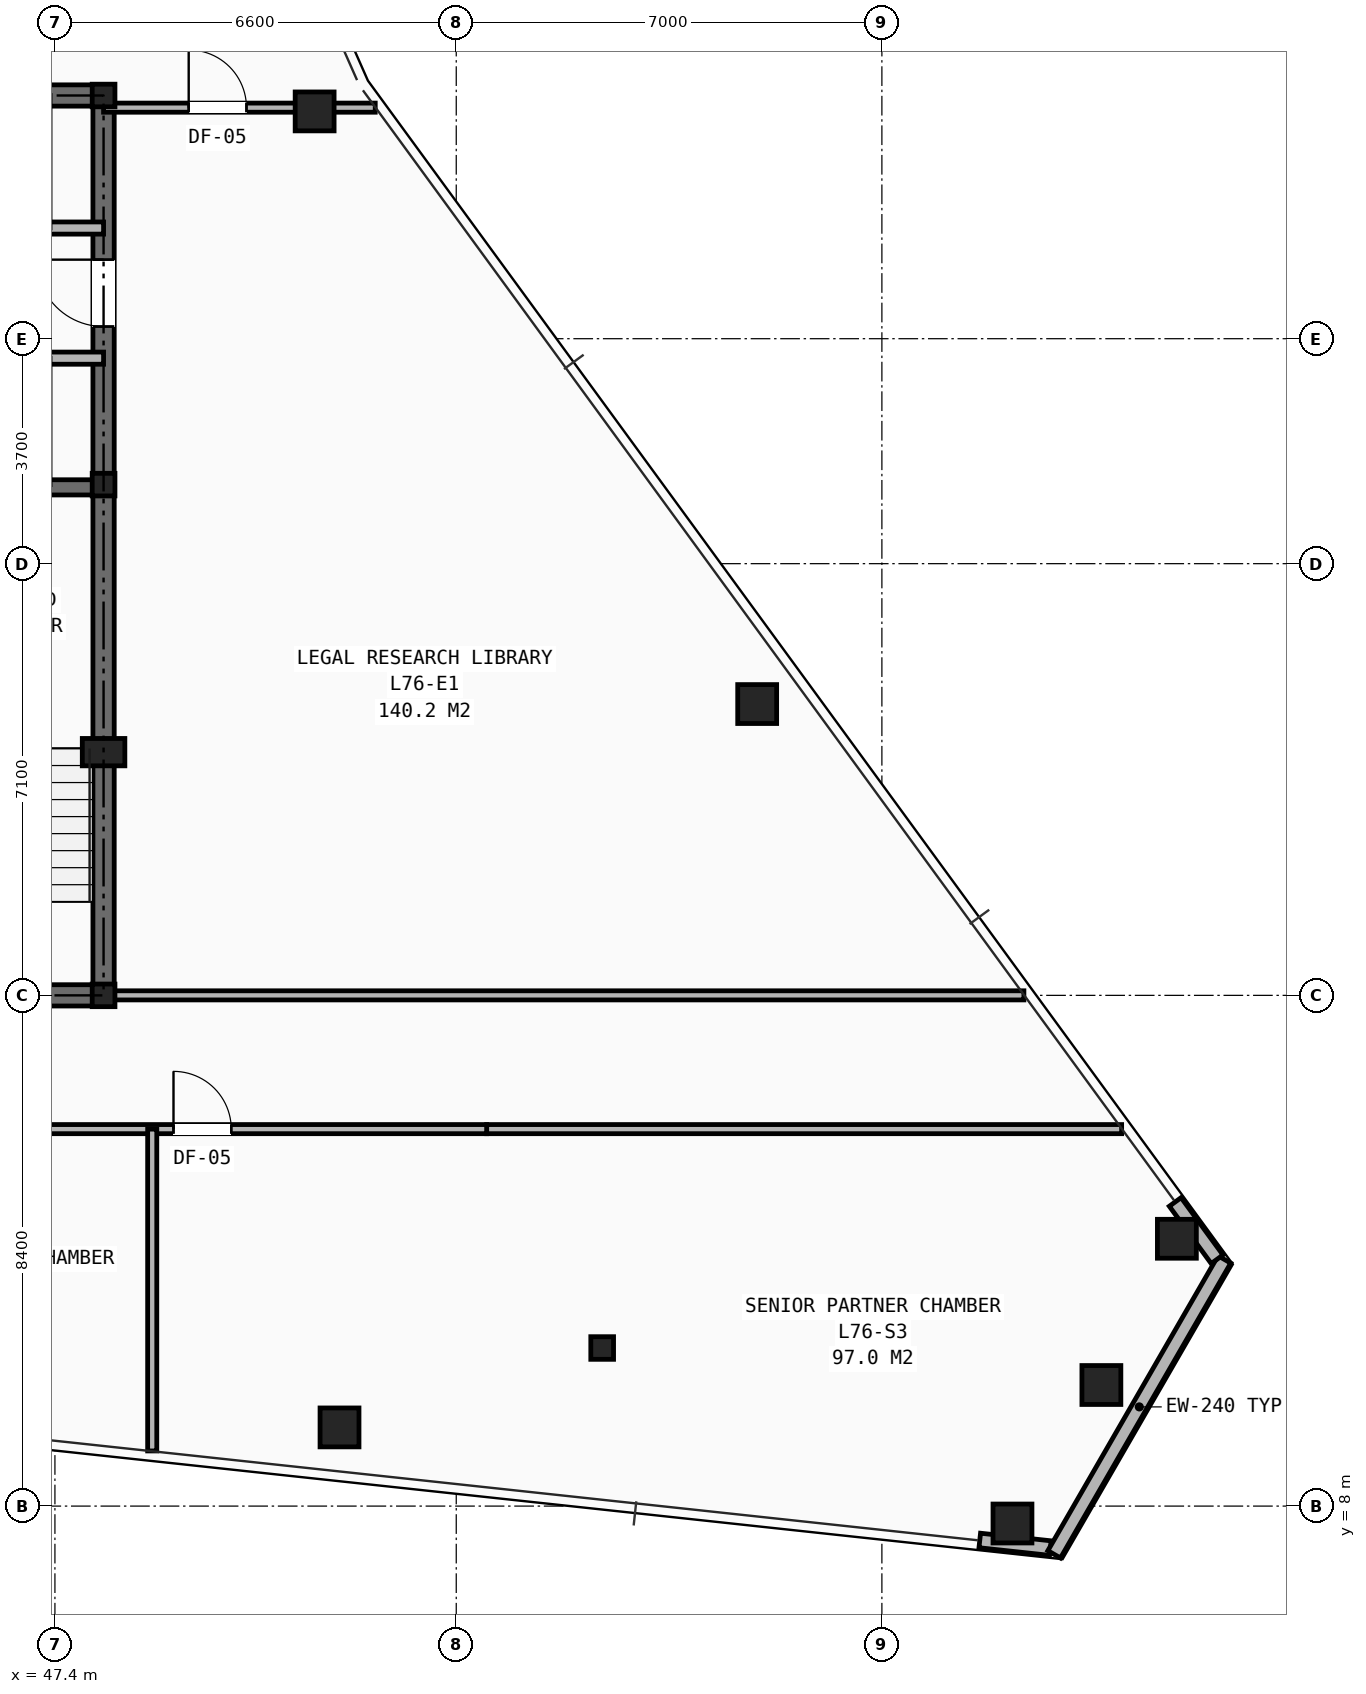
"""IFC4 building model, lengths in metres.
Left out: names, types, materials, properties, quantities, classifications, styles, units other than length and angle.
Written with IfcOpenShell. Run it as: python <this file> out.ifc"""

import sys

from ifc_helpers import new_model, si_unit, direction, frame, frame_2d, origin, origin_2d, place, context, subcontext, project, spatial, rectangle, hollow_rectangle, i_section, extrude, element, fill, save


model = new_model("IFC4")
c1 = context("Model", 3, precision=1e-05, world=origin(), true_north=direction((0.0, 1.0)))
c2 = subcontext(c1, "Body", "Model", "MODEL_VIEW")
j1 = project(units=[si_unit("LENGTHUNIT", "METRE"), si_unit("PLANEANGLEUNIT", "RADIAN")], contexts=[c1])
p1 = place(None, origin())
s1 = spatial("IfcSite", under=j1, at=p1, CompositionType="ELEMENT")
p2 = place(p1, origin())
s2 = spatial("IfcBuilding", under=s1, at=p2, CompositionType="ELEMENT")
p3 = place(p2, frame((0.0, 0.0, 269.0)))
s3 = spatial("IfcBuildingStorey", under=s2, at=p3, CompositionType="ELEMENT", Elevation=269.0)
for number, where, z_axis, x_axis in (
    (1, (48.2, 16.4, 0.0), (0.0, 0.0, 1.0), (1.0, 0.0, 0.0)),
    (2, (48.2, 24.8, 0.0), (0.0, 0.0, 1.0), (1.0, 0.0, 0.0)),
    (3, (48.2, 31.2, 0.0), (0.0, 0.0, 1.0), (1.0, 0.0, 0.0)),
    (4, (56.4, 10.6, 0.0), (0.0, 0.0, 1.0), (1.0, 0.0, 0.0)),
):
    element("IfcColumn", number, at=place(p3, frame(where, z_axis=z_axis, x_axis=x_axis)), inside=s3, PredefinedType="COLUMN", context=c2, shape_type="SweptSolid", body=[
        extrude(i_section(OverallWidth=0.374, OverallDepth=0.372, WebThickness=0.016, FlangeThickness=0.026, at=origin_2d()), origin(), (0.0, 0.0, 1.0), 3.5),
    ])
p4 = place(p3, frame((48.2, 20.4, 0.0), z_axis=(0.0, 0.0, 1.0), x_axis=(1.0, 0.0, 0.0)))
e5 = element("IfcColumn", 5, at=p4, inside=s3, PredefinedType="PILASTER", context=c2, shape_type="SweptSolid", body=[
    extrude(rectangle(XDim=0.7, YDim=0.45, at=origin_2d()), origin(), (0.0, 0.0, 1.0), 3.5),
])
for number, where, z_axis, x_axis in (
    (6, (52.08, 9.294, 0.0), (0.0, 0.0, 1.0), (1.0, 0.0, 0.0)),
    (7, (63.148, 7.714, 0.0), (0.0, 0.0, 1.0), (1.0, 0.0, 0.0)),
    (8, (64.61, 9.991, 0.0), (0.0, 0.0, 1.0), (1.0, 0.0, 0.0)),
    (9, (65.851, 12.397, 0.0), (0.0, 0.0, 1.0), (1.0, 0.0, 0.0)),
    (10, (58.949, 21.191, 0.0), (0.0, 0.0, 1.0), (1.0, 0.0, 0.0)),
    (11, (51.671, 30.938, 0.0), (0.0, 0.0, 1.0), (1.0, 0.0, 0.0)),
):
    element("IfcColumn", number, at=place(p3, frame(where, z_axis=z_axis, x_axis=x_axis)), inside=s3, PredefinedType="COLUMN", context=c2, shape_type="SweptSolid", body=[
        extrude(hollow_rectangle(XDim=0.64, YDim=0.64, WallThickness=0.045, at=origin_2d()), origin(), (0.0, 0.0, 1.0), 3.5),
    ])
p5 = place(p3, frame((62.61, 7.435, 0.0), z_axis=(0.0, 0.0, 1.0), x_axis=(0.994228168344, -0.107286295827, 0.0)))
e12 = element("IfcWall", 12, at=p5, inside=s3, PredefinedType="SHEAR", context=c2, shape_type="SweptSolid", body=[
    extrude(rectangle(XDim=1.167, YDim=0.24, at=frame_2d((0.584, 0.0))), origin(), (0.0, 0.0, 1.0), 2.623),
])
p6 = place(p3, frame((66.633, 12.056, 0.0), z_axis=(0.0, 0.0, 1.0), x_axis=(-0.49999793692, -0.866026594901, 0.0)))
e13 = element("IfcWall", 13, at=p6, inside=s3, PredefinedType="SHEAR", context=c2, shape_type="SweptSolid", body=[
    extrude(rectangle(XDim=5.6, YDim=0.24, at=frame_2d((2.8, 0.0))), origin(), (0.0, 0.0, 1.0), 2.623),
])
p7 = place(p3, frame((66.513, 12.06, 0.0), z_axis=(0.0, 0.0, 1.0), x_axis=(-0.589948424207, 0.807440930827, 0.0)))
e14 = element("IfcWall", 14, at=p7, inside=s3, PredefinedType="SHEAR", context=c2, shape_type="SweptSolid", body=[
    extrude(rectangle(XDim=1.167, YDim=0.24, at=frame_2d((0.584, 0.0))), origin(), (0.0, 0.0, 1.0), 2.623),
])
p8 = place(p3, frame((31.8, 16.4, 0.0), z_axis=(0.0, 0.0, 1.0), x_axis=(1.0, 0.0, 0.0)))
e15 = element("IfcWall", 15, at=p8, inside=s3, PredefinedType="SHEAR", context=c2, shape_type="SweptSolid", body=[
    extrude(rectangle(XDim=16.4, YDim=0.35, at=frame_2d((8.2, 0.0))), origin(), (0.0, 0.0, 1.0), 3.25),
])
p9 = place(p8, frame((4.2, 0.0, 0.0)))
e16 = element("IfcOpeningElement", 16, at=p9, cuts=e15, PredefinedType="OPENING", context=c2, shape_type="SweptSolid", body=[
    extrude(rectangle(XDim=0.95, YDim=2.1, at=frame_2d((0.475, 1.05))), frame((0.0, 0.185, 0.0), z_axis=(0.0, -1.0, 0.0), x_axis=(1.0, 0.0, 0.0)), (0.0, 0.0, 1.0), 0.37),
])
p10 = place(p8, frame((10.6, 0.0, 0.0)))
e17 = element("IfcOpeningElement", 17, at=p10, cuts=e15, PredefinedType="OPENING", context=c2, shape_type="SweptSolid", body=[
    extrude(rectangle(XDim=0.95, YDim=2.1, at=frame_2d((0.475, 1.05))), frame((0.0, 0.185, 0.0), z_axis=(0.0, -1.0, 0.0), x_axis=(1.0, 0.0, 0.0)), (0.0, 0.0, 1.0), 0.37),
])
p11 = place(p3, frame((31.8, 31.2, 0.0), z_axis=(0.0, 0.0, 1.0), x_axis=(1.0, 0.0, 0.0)))
e18 = element("IfcWall", 18, at=p11, inside=s3, PredefinedType="SHEAR", context=c2, shape_type="SweptSolid", body=[
    extrude(rectangle(XDim=16.4, YDim=0.35, at=frame_2d((8.2, 0.0))), origin(), (0.0, 0.0, 1.0), 3.25),
])
p12 = place(p3, frame((48.2, 16.4, 0.0), z_axis=(0.0, 0.0, 1.0), x_axis=(0.0, 1.0, 0.0)))
e19 = element("IfcWall", 19, at=p12, inside=s3, PredefinedType="SHEAR", context=c2, shape_type="SweptSolid", body=[
    extrude(rectangle(XDim=14.8, YDim=0.35, at=frame_2d((7.4, 0.0))), origin(), (0.0, 0.0, 1.0), 3.25),
])
p13 = place(p12, frame((11.0, 0.0, 0.0)))
e20 = element("IfcOpeningElement", 20, at=p13, cuts=e19, PredefinedType="OPENING", context=c2, shape_type="SweptSolid", body=[
    extrude(rectangle(XDim=1.1, YDim=2.15, at=frame_2d((0.55, 1.075))), frame((0.0, 0.185, 0.0), z_axis=(0.0, -1.0, 0.0), x_axis=(1.0, 0.0, 0.0)), (0.0, 0.0, 1.0), 0.37),
])
p14 = place(p3, frame((44.955, 24.755, 0.0), z_axis=(0.0, 0.0, 1.0), x_axis=(1.0, 0.0, 0.0)))
e21 = element("IfcWall", 21, at=p14, inside=s3, PredefinedType="SHEAR", context=c2, shape_type="SweptSolid", body=[
    extrude(rectangle(XDim=3.245, YDim=0.25, at=frame_2d((1.623, 0.0))), origin(), (0.0, 0.0, 1.0), 3.25),
])
p15 = place(p3, frame((33.82, 29.02, 0.0), z_axis=(0.0, 0.0, 1.0), x_axis=(1.0, 0.0, 0.0)))
e22 = element("IfcWall", 22, at=p15, inside=s3, PredefinedType="SOLIDWALL", context=c2, shape_type="SweptSolid", body=[
    extrude(rectangle(XDim=14.38, YDim=0.2, at=frame_2d((7.19, 0.0))), origin(), (0.0, 0.0, 1.0), 2.705),
])
p16 = place(p15, frame((3.92, 0.0, 0.0)))
e23 = element("IfcOpeningElement", 23, at=p16, cuts=e22, PredefinedType="OPENING", context=c2, shape_type="SweptSolid", body=[
    extrude(rectangle(XDim=0.9, YDim=2.1, at=frame_2d((0.45, 1.05))), frame((0.0, 0.11, 0.0), z_axis=(0.0, -1.0, 0.0), x_axis=(1.0, 0.0, 0.0)), (0.0, 0.0, 1.0), 0.22),
])
p17 = place(p15, frame((9.39, 0.0, 0.0)))
e24 = element("IfcOpeningElement", 24, at=p17, cuts=e22, PredefinedType="OPENING", context=c2, shape_type="SweptSolid", body=[
    extrude(rectangle(XDim=1.1, YDim=2.15, at=frame_2d((0.55, 1.075))), frame((0.0, 0.11, 0.0), z_axis=(0.0, -1.0, 0.0), x_axis=(1.0, 0.0, 0.0)), (0.0, 0.0, 1.0), 0.22),
])
p18 = place(p15, frame((11.71, 0.0, 0.0)))
e25 = element("IfcOpeningElement", 25, at=p18, cuts=e22, PredefinedType="OPENING", context=c2, shape_type="SweptSolid", body=[
    extrude(rectangle(XDim=1.1, YDim=2.15, at=frame_2d((0.55, 1.075))), frame((0.0, 0.11, 0.0), z_axis=(0.0, -1.0, 0.0), x_axis=(1.0, 0.0, 0.0)), (0.0, 0.0, 1.0), 0.22),
])
p19 = place(p3, frame((33.82, 26.88, 0.0), z_axis=(0.0, 0.0, 1.0), x_axis=(1.0, 0.0, 0.0)))
e26 = element("IfcWall", 26, at=p19, inside=s3, PredefinedType="SOLIDWALL", context=c2, shape_type="SweptSolid", body=[
    extrude(rectangle(XDim=14.38, YDim=0.2, at=frame_2d((7.19, 0.0))), origin(), (0.0, 0.0, 1.0), 2.705),
])
p20 = place(p19, frame((1.78, 0.0, 0.0)))
e27 = element("IfcOpeningElement", 27, at=p20, cuts=e26, PredefinedType="OPENING", context=c2, shape_type="SweptSolid", body=[
    extrude(rectangle(XDim=0.9, YDim=2.1, at=frame_2d((0.45, 1.05))), frame((0.0, 0.11, 0.0), z_axis=(0.0, -1.0, 0.0), x_axis=(1.0, 0.0, 0.0)), (0.0, 0.0, 1.0), 0.22),
])
p21 = place(p19, frame((6.07, 0.0, 0.0)))
e28 = element("IfcOpeningElement", 28, at=p21, cuts=e26, PredefinedType="OPENING", context=c2, shape_type="SweptSolid", body=[
    extrude(rectangle(XDim=0.9, YDim=2.1, at=frame_2d((0.45, 1.05))), frame((0.0, 0.11, 0.0), z_axis=(0.0, -1.0, 0.0), x_axis=(1.0, 0.0, 0.0)), (0.0, 0.0, 1.0), 0.22),
])
p22 = place(p19, frame((9.39, 0.0, 0.0)))
e29 = element("IfcOpeningElement", 29, at=p22, cuts=e26, PredefinedType="OPENING", context=c2, shape_type="SweptSolid", body=[
    extrude(rectangle(XDim=1.1, YDim=2.15, at=frame_2d((0.55, 1.075))), frame((0.0, 0.11, 0.0), z_axis=(0.0, -1.0, 0.0), x_axis=(1.0, 0.0, 0.0)), (0.0, 0.0, 1.0), 0.22),
])
p23 = place(p19, frame((11.71, 0.0, 0.0)))
e30 = element("IfcOpeningElement", 30, at=p23, cuts=e26, PredefinedType="OPENING", context=c2, shape_type="SweptSolid", body=[
    extrude(rectangle(XDim=1.1, YDim=2.15, at=frame_2d((0.55, 1.075))), frame((0.0, 0.11, 0.0), z_axis=(0.0, -1.0, 0.0), x_axis=(1.0, 0.0, 0.0)), (0.0, 0.0, 1.0), 0.22),
])
p24 = place(p3, frame((54.5, 14.2, 0.0), z_axis=(0.0, 0.0, 1.0), x_axis=(1.0, 0.0, 0.0)))
e31 = element("IfcWall", 31, at=p24, inside=s3, PredefinedType="PARTITIONING", context=c2, shape_type="SweptSolid", body=[
    extrude(rectangle(XDim=10.443, YDim=0.15, at=frame_2d((5.221, 0.0))), origin(), (0.0, 0.0, 1.0), 2.292),
])
p25 = place(p3, frame((48.2, 16.4, 0.0), z_axis=(0.0, 0.0, 1.0), x_axis=(1.0, 0.0, 0.0)))
e32 = element("IfcWall", 32, at=p25, inside=s3, PredefinedType="PARTITIONING", context=c2, shape_type="SweptSolid", body=[
    extrude(rectangle(XDim=15.135, YDim=0.15, at=frame_2d((7.568, 0.0))), origin(), (0.0, 0.0, 1.0), 2.292),
])
p26 = place(p3, frame((25.5, 14.2, 0.0), z_axis=(0.0, 0.0, 1.0), x_axis=(1.0, 0.0, 0.0)))
e33 = element("IfcWall", 33, at=p26, inside=s3, PredefinedType="PARTITIONING", context=c2, shape_type="SweptSolid", body=[
    extrude(rectangle(XDim=29.0, YDim=0.15, at=frame_2d((14.5, 0.0))), origin(), (0.0, 0.0, 1.0), 2.292),
])
p27 = place(p26, frame((0.85, 0.0, 0.0)))
e34 = element("IfcOpeningElement", 34, at=p27, cuts=e33, PredefinedType="OPENING", context=c2, shape_type="SweptSolid", body=[
    extrude(rectangle(XDim=0.95, YDim=2.1, at=frame_2d((0.475, 1.05))), frame((0.0, 0.085, 0.0), z_axis=(0.0, -1.0, 0.0), x_axis=(1.0, 0.0, 0.0)), (0.0, 0.0, 1.0), 0.17),
])
p28 = place(p26, frame((5.85, 0.0, 0.0)))
e35 = element("IfcOpeningElement", 35, at=p28, cuts=e33, PredefinedType="OPENING", context=c2, shape_type="SweptSolid", body=[
    extrude(rectangle(XDim=0.95, YDim=2.1, at=frame_2d((0.475, 1.05))), frame((0.0, 0.085, 0.0), z_axis=(0.0, -1.0, 0.0), x_axis=(1.0, 0.0, 0.0)), (0.0, 0.0, 1.0), 0.17),
])
p29 = place(p26, frame((23.85, 0.0, 0.0)))
e36 = element("IfcOpeningElement", 36, at=p29, cuts=e33, PredefinedType="OPENING", context=c2, shape_type="SweptSolid", body=[
    extrude(rectangle(XDim=0.95, YDim=2.1, at=frame_2d((0.475, 1.05))), frame((0.0, 0.085, 0.0), z_axis=(0.0, -1.0, 0.0), x_axis=(1.0, 0.0, 0.0)), (0.0, 0.0, 1.0), 0.17),
])
p30 = place(p3, frame((49.0, 8.907, 0.0), z_axis=(0.0, 0.0, 1.0), x_axis=(0.0, 1.0, 0.0)))
e37 = element("IfcWall", 37, at=p30, inside=s3, PredefinedType="PARTITIONING", context=c2, shape_type="SweptSolid", body=[
    extrude(rectangle(XDim=5.293, YDim=0.15, at=frame_2d((2.646, 0.0))), origin(), (0.0, 0.0, 1.0), 2.628),
])
p31 = place(p3, frame((48.2, 31.0, 0.0), z_axis=(0.0, 0.0, 1.0), x_axis=(1.0, 0.0, 0.0)))
e38 = element("IfcWall", 38, at=p31, inside=s3, PredefinedType="PARTITIONING", context=c2, shape_type="SweptSolid", body=[
    extrude(rectangle(XDim=4.468, YDim=0.15, at=frame_2d((2.234, 0.0))), origin(), (0.0, 0.0, 1.0), 2.292),
])
p32 = place(p31, frame((1.4, 0.0, 0.0)))
e39 = element("IfcOpeningElement", 39, at=p32, cuts=e38, PredefinedType="OPENING", context=c2, shape_type="SweptSolid", body=[
    extrude(rectangle(XDim=0.95, YDim=2.1, at=frame_2d((0.475, 1.05))), frame((0.0, 0.085, 0.0), z_axis=(0.0, -1.0, 0.0), x_axis=(1.0, 0.0, 0.0)), (0.0, 0.0, 1.0), 0.17),
])
p33 = place(p13, origin())
e40 = element("IfcDoor", 40, at=p33, inside=s3, OperationType="SINGLE_SWING_RIGHT", PredefinedType="DOOR", context=c2, shape_type="SweptSolid", body=[
    extrude(rectangle(XDim=1.1, YDim=2.15, at=frame_2d((0.55, 1.075))), frame((0.0, 0.025, 0.0), z_axis=(0.0, -1.0, 0.0), x_axis=(1.0, 0.0, 0.0)), (0.0, 0.0, 1.0), 0.05),
])
fill(e20, e40)
p34 = place(p29, origin())
e41 = element("IfcDoor", 41, at=p34, inside=s3, OperationType="SINGLE_SWING_LEFT", PredefinedType="DOOR", context=c2, shape_type="SweptSolid", body=[
    extrude(rectangle(XDim=0.95, YDim=2.1, at=frame_2d((0.475, 1.05))), frame((0.0, 0.025, 0.0), z_axis=(0.0, -1.0, 0.0), x_axis=(1.0, 0.0, 0.0)), (0.0, 0.0, 1.0), 0.05),
])
fill(e36, e41)
p35 = place(p32, origin())
e42 = element("IfcDoor", 42, at=p35, inside=s3, OperationType="SINGLE_SWING_LEFT", PredefinedType="DOOR", context=c2, shape_type="SweptSolid", body=[
    extrude(rectangle(XDim=0.95, YDim=2.1, at=frame_2d((0.475, 1.05))), frame((0.0, 0.025, 0.0), z_axis=(0.0, -1.0, 0.0), x_axis=(1.0, 0.0, 0.0)), (0.0, 0.0, 1.0), 0.05),
])
fill(e39, e42)
save(model, sys.argv[1])
